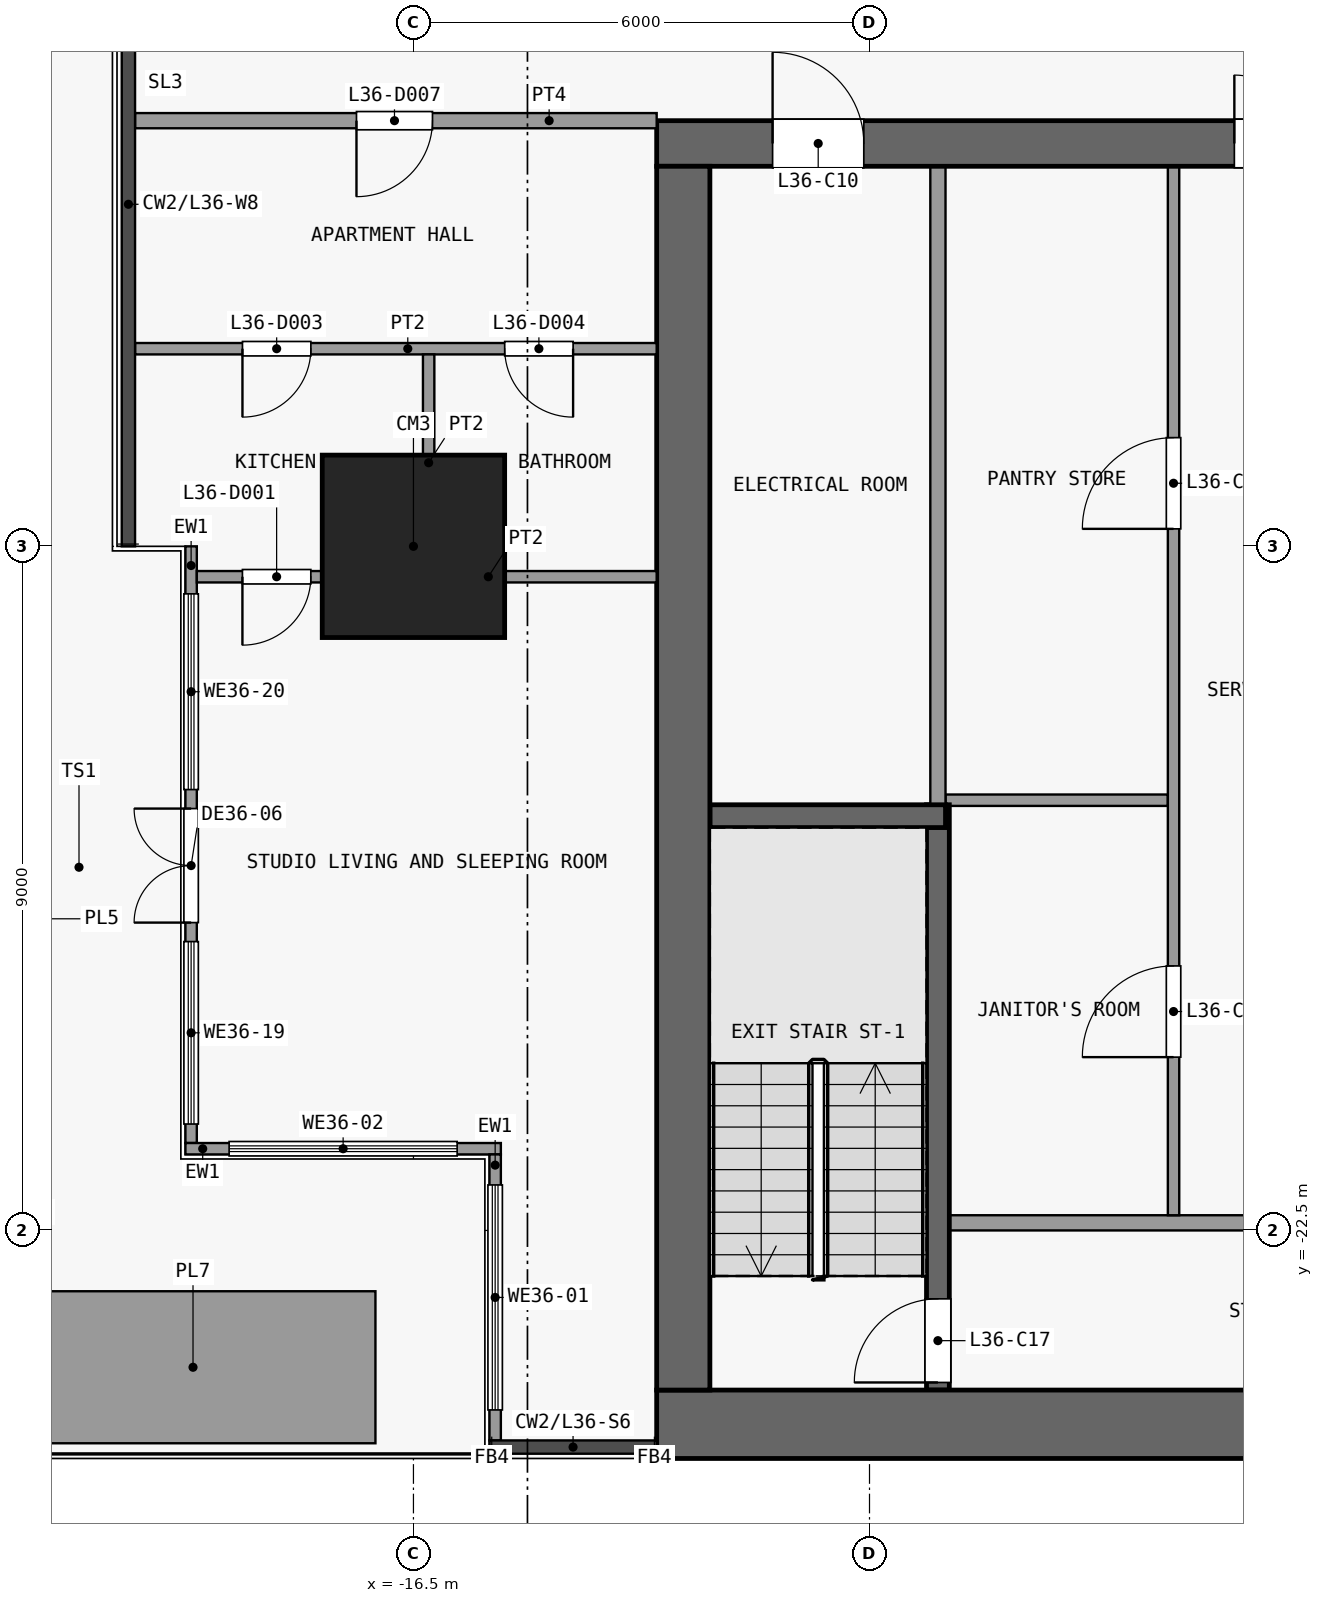
"""IFC4 building model, lengths in metres.
Left out: names, types, materials, properties, quantities, classifications, styles, units other than length and angle.
Written with IfcOpenShell. Run it as: python <this file> out.ifc"""

import sys

from ifc_helpers import new_model, si_unit, direction, frame, frame_2d, origin, origin_2d, place, context, subcontext, project, spatial, rectangle, extrude, element, fill, save


model = new_model("IFC4")
c1 = context("Model", 3, precision=1e-05, world=origin(), true_north=direction((0.0, 1.0)))
c2 = subcontext(c1, "Body", "Model", "MODEL_VIEW")
j1 = project(units=[si_unit("LENGTHUNIT", "METRE"), si_unit("PLANEANGLEUNIT", "RADIAN")], contexts=[c1])
p1 = place(None, origin())
s1 = spatial("IfcSite", under=j1, at=p1, CompositionType="ELEMENT")
p2 = place(p1, origin())
s2 = spatial("IfcBuilding", under=s1, at=p2, CompositionType="ELEMENT")
p3 = place(p2, frame((0.0, 0.0, 149.3)))
s3 = spatial("IfcBuildingStorey", under=s2, at=p3, CompositionType="ELEMENT", Elevation=149.3)
p4 = place(p3, frame((-16.5, -13.5, 0.0), z_axis=(0.0, 0.0, 1.0), x_axis=(1.0, 0.0, 0.0)))
e1 = element("IfcColumn", 1, at=p4, inside=s3, PredefinedType="COLUMN", context=c2, shape_type="SweptSolid", body=[
    extrude(rectangle(XDim=2.4, YDim=2.4, at=origin_2d()), origin(), (0.0, 0.0, 1.0), 3.6),
])
p5 = place(p3, frame((-13.3, -25.05, 0.0), z_axis=(0.0, 0.0, 1.0), x_axis=(1.0, 0.0, 0.0)))
e2 = element("IfcWall", 2, at=p5, inside=s3, PredefinedType="SHEAR", context=c2, shape_type="SweptSolid", body=[
    extrude(rectangle(XDim=26.6, YDim=0.9, at=frame_2d((13.3, 0.0))), origin(), (0.0, 0.0, 1.0), 3.3),
])
p6 = place(p3, frame((-13.3, -8.2, 0.0), z_axis=(0.0, 0.0, 1.0), x_axis=(1.0, 0.0, 0.0)))
e3 = element("IfcWall", 3, at=p6, inside=s3, PredefinedType="SHEAR", context=c2, shape_type="SweptSolid", body=[
    extrude(rectangle(XDim=26.6, YDim=0.6, at=frame_2d((13.3, 0.0))), origin(), (0.0, 0.0, 1.0), 3.3),
])
p7 = place(p6, frame((7.6, 0.0, 0.0)))
e4 = element("IfcOpeningElement", 4, at=p7, cuts=e3, PredefinedType="OPENING", context=c2, shape_type="SweptSolid", body=[
    extrude(rectangle(XDim=1.8, YDim=2.1, at=frame_2d((0.9, 1.05))), frame((0.0, 0.31, 0.0), z_axis=(0.0, -1.0, 0.0), x_axis=(1.0, 0.0, 0.0)), (0.0, 0.0, 1.0), 0.62),
])
p8 = place(p6, frame((17.2, 0.0, 0.0)))
e5 = element("IfcOpeningElement", 5, at=p8, cuts=e3, PredefinedType="OPENING", context=c2, shape_type="SweptSolid", body=[
    extrude(rectangle(XDim=1.8, YDim=2.1, at=frame_2d((0.9, 1.05))), frame((0.0, 0.31, 0.0), z_axis=(0.0, -1.0, 0.0), x_axis=(1.0, 0.0, 0.0)), (0.0, 0.0, 1.0), 0.62),
])
p9 = place(p6, frame((1.525, 0.0, 0.0)))
e6 = element("IfcOpeningElement", 6, at=p9, cuts=e3, PredefinedType="OPENING", context=c2, shape_type="SweptSolid", body=[
    extrude(rectangle(XDim=1.2, YDim=2.1, at=frame_2d((0.6, 1.05))), frame((0.0, 0.31, 0.0), z_axis=(0.0, -1.0, 0.0), x_axis=(1.0, 0.0, 0.0)), (0.0, 0.0, 1.0), 0.62),
])
p10 = place(p6, frame((23.175, 0.0, 0.0)))
e7 = element("IfcOpeningElement", 7, at=p10, cuts=e3, PredefinedType="OPENING", context=c2, shape_type="SweptSolid", body=[
    extrude(rectangle(XDim=0.9, YDim=2.1, at=frame_2d((0.45, 1.05))), frame((0.0, 0.31, 0.0), z_axis=(0.0, -1.0, 0.0), x_axis=(1.0, 0.0, 0.0)), (0.0, 0.0, 1.0), 0.62),
])
p11 = place(p3, frame((-12.95, -24.6, 0.0), z_axis=(0.0, 0.0, 1.0), x_axis=(0.0, 1.0, 0.0)))
e8 = element("IfcWall", 8, at=p11, inside=s3, PredefinedType="SHEAR", context=c2, shape_type="SweptSolid", body=[
    extrude(rectangle(XDim=16.1, YDim=0.7, at=frame_2d((8.05, 0.0))), origin(), (0.0, 0.0, 1.0), 3.3),
])
p12 = place(p3, frame((-3.25, -22.4, 0.0), z_axis=(0.0, 0.0, 1.0), x_axis=(-1.0, 0.0, 0.0)))
e9 = element("IfcWall", 9, at=p12, inside=s3, PredefinedType="PARTITIONING", context=c2, shape_type="SweptSolid", body=[
    extrude(rectangle(XDim=6.2, YDim=0.2, at=frame_2d((3.1, 0.0))), origin(), (0.0, 0.0, 1.0), 3.3),
])
p13 = place(p12, frame((0.8, 0.0, 0.0)))
e10 = element("IfcOpeningElement", 10, at=p13, cuts=e9, PredefinedType="OPENING", context=c2, shape_type="SweptSolid", body=[
    extrude(rectangle(XDim=1.5, YDim=2.1, at=frame_2d((0.75, 1.05))), frame((0.0, 0.11, 0.0), z_axis=(0.0, -1.0, 0.0), x_axis=(1.0, 0.0, 0.0)), (0.0, 0.0, 1.0), 0.22),
])
p14 = place(p3, frame((-12.6, -17.05, 0.0), z_axis=(0.0, 0.0, 1.0), x_axis=(1.0, 0.0, 0.0)))
e11 = element("IfcWall", 11, at=p14, inside=s3, PredefinedType="SHEAR", context=c2, shape_type="SweptSolid", body=[
    extrude(rectangle(XDim=3.1, YDim=0.3, at=frame_2d((1.55, 0.0))), origin(), (0.0, 0.0, 1.0), 3.3),
])
p15 = place(p3, frame((-9.5, -16.84, 0.0), z_axis=(0.0, 0.0, 1.0), x_axis=(1.0, 0.0, 0.0)))
e12 = element("IfcWall", 12, at=p15, inside=s3, PredefinedType="PARTITIONING", context=c2, shape_type="SweptSolid", body=[
    extrude(rectangle(XDim=2.925, YDim=0.15, at=frame_2d((1.462, 0.0))), origin(), (0.0, 0.0, 1.0), 3.3),
])
p16 = place(p3, frame((-9.6, -24.6, 0.0), z_axis=(0.0, 0.0, 1.0), x_axis=(0.0, 1.0, 0.0)))
e13 = element("IfcWall", 13, at=p16, inside=s3, PredefinedType="SHEAR", context=c2, shape_type="SweptSolid", body=[
    extrude(rectangle(XDim=7.7, YDim=0.3, at=frame_2d((3.85, 0.0))), origin(), (0.0, 0.0, 1.0), 3.3),
])
p17 = place(p16, frame((0.1, 0.0, 0.0)))
e14 = element("IfcOpeningElement", 14, at=p17, cuts=e13, PredefinedType="OPENING", context=c2, shape_type="SweptSolid", body=[
    extrude(rectangle(XDim=1.1, YDim=2.1, at=frame_2d((0.55, 1.05))), frame((0.0, 0.16, 0.0), z_axis=(0.0, -1.0, 0.0), x_axis=(1.0, 0.0, 0.0)), (0.0, 0.0, 1.0), 0.32),
])
p18 = place(p3, frame((-9.6, -16.9, 0.0), z_axis=(0.0, 0.0, 1.0), x_axis=(0.0, 1.0, 0.0)))
e15 = element("IfcWall", 15, at=p18, inside=s3, PredefinedType="PARTITIONING", context=c2, shape_type="SweptSolid", body=[
    extrude(rectangle(XDim=8.4, YDim=0.2, at=frame_2d((4.2, 0.0))), origin(), (0.0, 0.0, 1.0), 3.3),
])
p19 = place(p3, frame((-6.5, -22.3, 0.0), z_axis=(0.0, 0.0, 1.0), x_axis=(0.0, 1.0, 0.0)))
e16 = element("IfcWall", 16, at=p19, inside=s3, PredefinedType="PARTITIONING", context=c2, shape_type="SweptSolid", body=[
    extrude(rectangle(XDim=13.8, YDim=0.15, at=frame_2d((6.9, 0.0))), origin(), (0.0, 0.0, 1.0), 3.3),
])
p20 = place(p19, frame((2.08, 0.0, 0.0)))
e17 = element("IfcOpeningElement", 17, at=p20, cuts=e16, PredefinedType="OPENING", context=c2, shape_type="SweptSolid", body=[
    extrude(rectangle(XDim=1.2, YDim=2.1, at=frame_2d((0.6, 1.05))), frame((0.0, 0.085, 0.0), z_axis=(0.0, -1.0, 0.0), x_axis=(1.0, 0.0, 0.0)), (0.0, 0.0, 1.0), 0.17),
])
p21 = place(p19, frame((9.03, 0.0, 0.0)))
e18 = element("IfcOpeningElement", 18, at=p21, cuts=e16, PredefinedType="OPENING", context=c2, shape_type="SweptSolid", body=[
    extrude(rectangle(XDim=1.2, YDim=2.1, at=frame_2d((0.6, 1.05))), frame((0.0, 0.085, 0.0), z_axis=(0.0, -1.0, 0.0), x_axis=(1.0, 0.0, 0.0)), (0.0, 0.0, 1.0), 0.17),
])
p22 = place(p3, frame((-15.425, -25.262, 0.0), z_axis=(0.0, 0.0, 1.0), x_axis=(0.0, 1.0, 0.0)))
e19 = element("IfcWall", 19, at=p22, inside=s3, PredefinedType="SOLIDWALL", context=c2, shape_type="SweptSolid", body=[
    extrude(rectangle(XDim=3.762, YDim=0.15, at=frame_2d((1.881, 0.0))), origin(), (0.0, 0.0, 1.0), 3.3),
])
p23 = place(p22, frame((0.401, 0.0, 0.9)))
e20 = element("IfcOpeningElement", 20, at=p23, cuts=e19, PredefinedType="OPENING", context=c2, shape_type="SweptSolid", body=[
    extrude(rectangle(XDim=2.96, YDim=2.4, at=frame_2d((1.48, 1.2))), frame((0.0, 0.085, 0.0), z_axis=(0.0, -1.0, 0.0), x_axis=(1.0, 0.0, 0.0)), (0.0, 0.0, 1.0), 0.17),
])
p24 = place(p3, frame((-15.35, -21.425, 0.0), z_axis=(0.0, 0.0, 1.0), x_axis=(-1.0, 0.0, 0.0)))
e21 = element("IfcWall", 21, at=p24, inside=s3, PredefinedType="SOLIDWALL", context=c2, shape_type="SweptSolid", body=[
    extrude(rectangle(XDim=4.15, YDim=0.15, at=frame_2d((2.075, 0.0))), origin(), (0.0, 0.0, 1.0), 3.3),
])
p25 = place(p24, frame((0.575, 0.0, 0.9)))
e22 = element("IfcOpeningElement", 22, at=p25, cuts=e21, PredefinedType="OPENING", context=c2, shape_type="SweptSolid", body=[
    extrude(rectangle(XDim=3.0, YDim=2.4, at=frame_2d((1.5, 1.2))), frame((0.0, 0.085, 0.0), z_axis=(0.0, -1.0, 0.0), x_axis=(1.0, 0.0, 0.0)), (0.0, 0.0, 1.0), 0.17),
])
p26 = place(p3, frame((-19.425, -21.35, 0.0), z_axis=(0.0, 0.0, 1.0), x_axis=(0.0, 1.0, 0.0)))
e23 = element("IfcWall", 23, at=p26, inside=s3, PredefinedType="SOLIDWALL", context=c2, shape_type="SweptSolid", body=[
    extrude(rectangle(XDim=7.85, YDim=0.15, at=frame_2d((3.925, 0.0))), origin(), (0.0, 0.0, 1.0), 3.3),
])
p27 = place(p26, frame((2.9, 0.0, 0.0)))
e24 = element("IfcOpeningElement", 24, at=p27, cuts=e23, PredefinedType="OPENING", context=c2, shape_type="SweptSolid", body=[
    extrude(rectangle(XDim=1.5, YDim=2.4, at=frame_2d((0.75, 1.2))), frame((0.0, 0.085, 0.0), z_axis=(0.0, -1.0, 0.0), x_axis=(1.0, 0.0, 0.0)), (0.0, 0.0, 1.0), 0.17),
])
p28 = place(p26, frame((0.25, 0.0, 0.9)))
e25 = element("IfcOpeningElement", 25, at=p28, cuts=e23, PredefinedType="OPENING", context=c2, shape_type="SweptSolid", body=[
    extrude(rectangle(XDim=2.4, YDim=2.1, at=frame_2d((1.2, 1.05))), frame((0.0, 0.085, 0.0), z_axis=(0.0, -1.0, 0.0), x_axis=(1.0, 0.0, 0.0)), (0.0, 0.0, 1.0), 0.17),
])
p29 = place(p26, frame((4.65, 0.0, 0.9)))
e26 = element("IfcOpeningElement", 26, at=p29, cuts=e23, PredefinedType="OPENING", context=c2, shape_type="SweptSolid", body=[
    extrude(rectangle(XDim=2.575, YDim=2.1, at=frame_2d((1.288, 1.05))), frame((0.0, 0.085, 0.0), z_axis=(0.0, -1.0, 0.0), x_axis=(1.0, 0.0, 0.0)), (0.0, 0.0, 1.0), 0.17),
])
p30 = place(p3, frame((-21.8, -24.3, 0.0), z_axis=(0.0, 0.0, 1.0), x_axis=(1.0, 0.0, 0.0)))
e27 = element("IfcWall", 27, at=p30, inside=s3, PredefinedType="USERDEFINED", context=c2, shape_type="SweptSolid", body=[
    extrude(rectangle(XDim=4.8, YDim=2.0, at=frame_2d((2.4, 0.0))), origin(), (0.0, 0.0, 1.0), 0.9),
])
p31 = place(p3, frame((-19.35, -13.9, 0.0), z_axis=(0.0, 0.0, 1.0), x_axis=(1.0, 0.0, 0.0)))
e28 = element("IfcWall", 28, at=p31, inside=s3, PredefinedType="PARTITIONING", context=c2, shape_type="SweptSolid", body=[
    extrude(rectangle(XDim=6.05, YDim=0.15, at=frame_2d((3.025, 0.0))), origin(), (0.0, 0.0, 1.0), 3.3),
])
p32 = place(p31, frame((0.6, 0.0, 0.0)))
e29 = element("IfcOpeningElement", 29, at=p32, cuts=e28, PredefinedType="OPENING", context=c2, shape_type="SweptSolid", body=[
    extrude(rectangle(XDim=0.9, YDim=2.1, at=frame_2d((0.45, 1.05))), frame((0.0, 0.085, 0.0), z_axis=(0.0, -1.0, 0.0), x_axis=(1.0, 0.0, 0.0)), (0.0, 0.0, 1.0), 0.17),
])
p33 = place(p3, frame((-20.163, -10.9, 0.0), z_axis=(0.0, 0.0, 1.0), x_axis=(1.0, 0.0, 0.0)))
e30 = element("IfcWall", 30, at=p33, inside=s3, PredefinedType="PARTITIONING", context=c2, shape_type="SweptSolid", body=[
    extrude(rectangle(XDim=6.863, YDim=0.15, at=frame_2d((3.431, 0.0))), origin(), (0.0, 0.0, 1.0), 3.3),
])
p34 = place(p33, frame((1.413, 0.0, 0.0)))
e31 = element("IfcOpeningElement", 31, at=p34, cuts=e30, PredefinedType="OPENING", context=c2, shape_type="SweptSolid", body=[
    extrude(rectangle(XDim=0.9, YDim=2.1, at=frame_2d((0.45, 1.05))), frame((0.0, 0.085, 0.0), z_axis=(0.0, -1.0, 0.0), x_axis=(1.0, 0.0, 0.0)), (0.0, 0.0, 1.0), 0.17),
])
p35 = place(p33, frame((4.863, 0.0, 0.0)))
e32 = element("IfcOpeningElement", 32, at=p35, cuts=e30, PredefinedType="OPENING", context=c2, shape_type="SweptSolid", body=[
    extrude(rectangle(XDim=0.9, YDim=2.1, at=frame_2d((0.45, 1.05))), frame((0.0, 0.085, 0.0), z_axis=(0.0, -1.0, 0.0), x_axis=(1.0, 0.0, 0.0)), (0.0, 0.0, 1.0), 0.17),
])
p36 = place(p3, frame((-20.163, -7.9, 0.0), z_axis=(0.0, 0.0, 1.0), x_axis=(1.0, 0.0, 0.0)))
e33 = element("IfcWall", 33, at=p36, inside=s3, PredefinedType="PARTITIONING", context=c2, shape_type="SweptSolid", body=[
    extrude(rectangle(XDim=6.863, YDim=0.2, at=frame_2d((3.431, 0.0))), origin(), (0.0, 0.0, 1.0), 3.3),
])
p37 = place(p36, frame((2.913, 0.0, 0.0)))
e34 = element("IfcOpeningElement", 34, at=p37, cuts=e33, PredefinedType="OPENING", context=c2, shape_type="SweptSolid", body=[
    extrude(rectangle(XDim=1.0, YDim=2.1, at=frame_2d((0.5, 1.05))), frame((0.0, 0.11, 0.0), z_axis=(0.0, -1.0, 0.0), x_axis=(1.0, 0.0, 0.0)), (0.0, 0.0, 1.0), 0.22),
])
p38 = place(p3, frame((-16.3, -13.825, 0.0), z_axis=(0.0, 0.0, 1.0), x_axis=(0.0, 1.0, 0.0)))
e35 = element("IfcWall", 35, at=p38, inside=s3, PredefinedType="PARTITIONING", context=c2, shape_type="SweptSolid", body=[
    extrude(rectangle(XDim=2.85, YDim=0.15, at=frame_2d((1.425, 0.0))), origin(), (0.0, 0.0, 1.0), 3.3),
])
p39 = place(p7, origin())
e36 = element("IfcDoor", 36, at=p39, inside=s3, OperationType="DOUBLE_DOOR_SINGLE_SWING", PredefinedType="DOOR", context=c2, shape_type="SweptSolid", body=[
    extrude(rectangle(XDim=1.8, YDim=2.1, at=frame_2d((0.9, 1.05))), frame((0.0, 0.025, 0.0), z_axis=(0.0, -1.0, 0.0), x_axis=(1.0, 0.0, 0.0)), (0.0, 0.0, 1.0), 0.05),
])
fill(e4, e36)
p40 = place(p9, origin())
e37 = element("IfcDoor", 37, at=p40, inside=s3, OperationType="SINGLE_SWING_LEFT", PredefinedType="DOOR", context=c2, shape_type="SweptSolid", body=[
    extrude(rectangle(XDim=1.2, YDim=2.1, at=frame_2d((0.6, 1.05))), frame((0.0, 0.025, 0.0), z_axis=(0.0, -1.0, 0.0), x_axis=(1.0, 0.0, 0.0)), (0.0, 0.0, 1.0), 0.05),
])
fill(e6, e37)
p41 = place(p20, origin())
e38 = element("IfcDoor", 38, at=p41, inside=s3, OperationType="SINGLE_SWING_LEFT", PredefinedType="DOOR", context=c2, shape_type="SweptSolid", body=[
    extrude(rectangle(XDim=1.2, YDim=2.1, at=frame_2d((0.6, 1.05))), frame((0.0, 0.025, 0.0), z_axis=(0.0, -1.0, 0.0), x_axis=(1.0, 0.0, 0.0)), (0.0, 0.0, 1.0), 0.05),
])
fill(e17, e38)
p42 = place(p21, origin())
e39 = element("IfcDoor", 39, at=p42, inside=s3, OperationType="SINGLE_SWING_LEFT", PredefinedType="DOOR", context=c2, shape_type="SweptSolid", body=[
    extrude(rectangle(XDim=1.2, YDim=2.1, at=frame_2d((0.6, 1.05))), frame((0.0, 0.025, 0.0), z_axis=(0.0, -1.0, 0.0), x_axis=(1.0, 0.0, 0.0)), (0.0, 0.0, 1.0), 0.05),
])
fill(e18, e39)
p43 = place(p17, origin())
e40 = element("IfcDoor", 40, at=p43, inside=s3, OperationType="SINGLE_SWING_LEFT", PredefinedType="DOOR", context=c2, shape_type="SweptSolid", body=[
    extrude(rectangle(XDim=1.1, YDim=2.1, at=frame_2d((0.55, 1.05))), frame((0.0, 0.025, 0.0), z_axis=(0.0, -1.0, 0.0), x_axis=(1.0, 0.0, 0.0)), (0.0, 0.0, 1.0), 0.05),
])
fill(e14, e40)
p44 = place(p23, origin())
e41 = element("IfcWindow", 41, at=p44, inside=s3, PartitioningType="SINGLE_PANEL", PredefinedType="WINDOW", context=c2, shape_type="SweptSolid", body=[
    extrude(rectangle(XDim=2.96, YDim=2.4, at=frame_2d((1.48, 1.2))), frame((0.0, 0.03, 0.0), z_axis=(0.0, -1.0, 0.0), x_axis=(1.0, 0.0, 0.0)), (0.0, 0.0, 1.0), 0.06),
])
fill(e20, e41)
p45 = place(p25, origin())
e42 = element("IfcWindow", 42, at=p45, inside=s3, PartitioningType="SINGLE_PANEL", PredefinedType="WINDOW", context=c2, shape_type="SweptSolid", body=[
    extrude(rectangle(XDim=3.0, YDim=2.4, at=frame_2d((1.5, 1.2))), frame((0.0, 0.03, 0.0), z_axis=(0.0, -1.0, 0.0), x_axis=(1.0, 0.0, 0.0)), (0.0, 0.0, 1.0), 0.06),
])
fill(e22, e42)
p46 = place(p27, origin())
e43 = element("IfcDoor", 43, at=p46, inside=s3, OperationType="DOUBLE_DOOR_SINGLE_SWING", PredefinedType="DOOR", context=c2, shape_type="SweptSolid", body=[
    extrude(rectangle(XDim=1.5, YDim=2.4, at=frame_2d((0.75, 1.2))), frame((0.0, 0.025, 0.0), z_axis=(0.0, -1.0, 0.0), x_axis=(1.0, 0.0, 0.0)), (0.0, 0.0, 1.0), 0.05),
])
fill(e24, e43)
p47 = place(p28, origin())
e44 = element("IfcWindow", 44, at=p47, inside=s3, PartitioningType="SINGLE_PANEL", PredefinedType="WINDOW", context=c2, shape_type="SweptSolid", body=[
    extrude(rectangle(XDim=2.4, YDim=2.1, at=frame_2d((1.2, 1.05))), frame((0.0, 0.03, 0.0), z_axis=(0.0, -1.0, 0.0), x_axis=(1.0, 0.0, 0.0)), (0.0, 0.0, 1.0), 0.06),
])
fill(e25, e44)
p48 = place(p29, origin())
e45 = element("IfcWindow", 45, at=p48, inside=s3, PartitioningType="SINGLE_PANEL", PredefinedType="WINDOW", context=c2, shape_type="SweptSolid", body=[
    extrude(rectangle(XDim=2.575, YDim=2.1, at=frame_2d((1.288, 1.05))), frame((0.0, 0.03, 0.0), z_axis=(0.0, -1.0, 0.0), x_axis=(1.0, 0.0, 0.0)), (0.0, 0.0, 1.0), 0.06),
])
fill(e26, e45)
p49 = place(p32, origin())
e46 = element("IfcDoor", 46, at=p49, inside=s3, OperationType="SINGLE_SWING_LEFT", PredefinedType="DOOR", context=c2, shape_type="SweptSolid", body=[
    extrude(rectangle(XDim=0.9, YDim=2.1, at=frame_2d((0.45, 1.05))), frame((0.0, 0.025, 0.0), z_axis=(0.0, -1.0, 0.0), x_axis=(1.0, 0.0, 0.0)), (0.0, 0.0, 1.0), 0.05),
])
fill(e29, e46)
p50 = place(p34, origin())
e47 = element("IfcDoor", 47, at=p50, inside=s3, OperationType="SINGLE_SWING_LEFT", PredefinedType="DOOR", context=c2, shape_type="SweptSolid", body=[
    extrude(rectangle(XDim=0.9, YDim=2.1, at=frame_2d((0.45, 1.05))), frame((0.0, 0.025, 0.0), z_axis=(0.0, -1.0, 0.0), x_axis=(1.0, 0.0, 0.0)), (0.0, 0.0, 1.0), 0.05),
])
fill(e31, e47)
p51 = place(p35, origin())
e48 = element("IfcDoor", 48, at=p51, inside=s3, OperationType="SINGLE_SWING_RIGHT", PredefinedType="DOOR", context=c2, shape_type="SweptSolid", body=[
    extrude(rectangle(XDim=0.9, YDim=2.1, at=frame_2d((0.45, 1.05))), frame((0.0, 0.025, 0.0), z_axis=(0.0, -1.0, 0.0), x_axis=(1.0, 0.0, 0.0)), (0.0, 0.0, 1.0), 0.05),
])
fill(e32, e48)
p52 = place(p37, origin())
e49 = element("IfcDoor", 49, at=p52, inside=s3, OperationType="SINGLE_SWING_LEFT", PredefinedType="DOOR", context=c2, shape_type="SweptSolid", body=[
    extrude(rectangle(XDim=1.0, YDim=2.1, at=frame_2d((0.5, 1.05))), frame((0.0, 0.025, 0.0), z_axis=(0.0, -1.0, 0.0), x_axis=(1.0, 0.0, 0.0)), (0.0, 0.0, 1.0), 0.05),
])
fill(e34, e49)
save(model, sys.argv[1])
